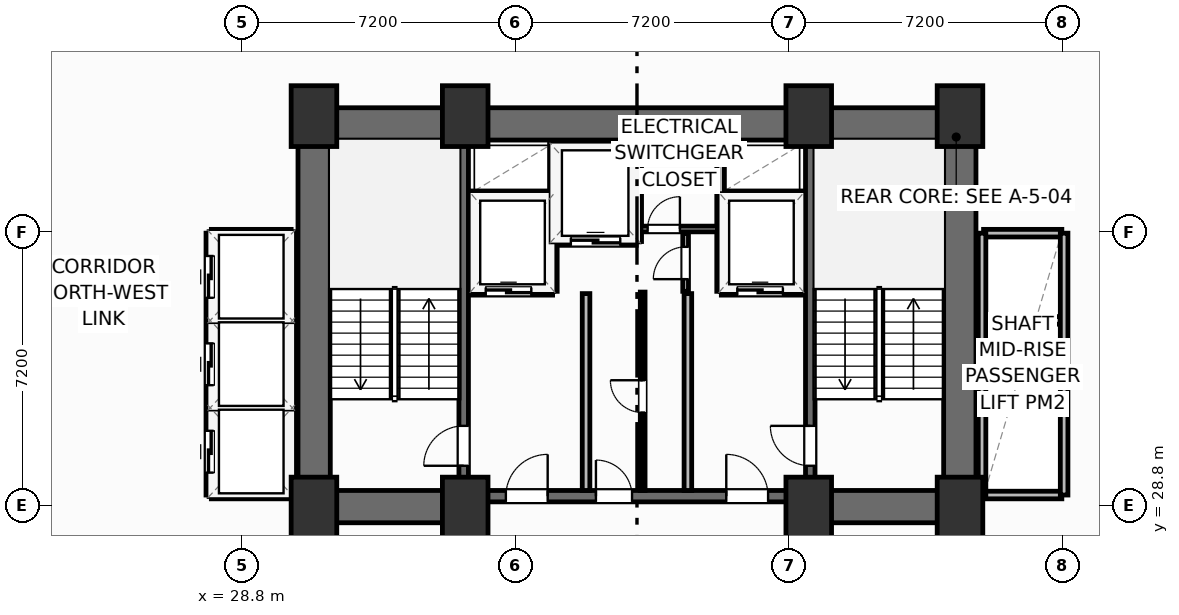
"""IFC4 building model, lengths in metres.
Left out: names, types, materials, properties, quantities, classifications, styles, units other than length and angle.
Written with IfcOpenShell. Run it as: python <this file> out.ifc"""

import sys

from ifc_helpers import new_model, si_unit, direction, frame, frame_2d, origin, origin_2d, place, context, subcontext, project, spatial, rectangle, extrude, element, fill, save


model = new_model("IFC4")
c1 = context("Model", 3, precision=1e-05, world=origin(), true_north=direction((0.0, 1.0)))
c2 = subcontext(c1, "Body", "Model", "MODEL_VIEW")
j1 = project(units=[si_unit("LENGTHUNIT", "METRE"), si_unit("PLANEANGLEUNIT", "RADIAN")], contexts=[c1])
p1 = place(None, origin())
s1 = spatial("IfcSite", under=j1, at=p1, CompositionType="ELEMENT")
p2 = place(p1, origin())
s2 = spatial("IfcBuilding", under=s1, at=p2, CompositionType="ELEMENT")
p3 = place(p2, frame((0.0, 0.0, 67.7)))
s3 = spatial("IfcBuildingStorey", under=s2, at=p3, CompositionType="ELEMENT", Elevation=67.7)
for number, where, z_axis, x_axis in (
    (1, (30.7, 28.75, 0.0), (0.0, 0.0, 1.0), (1.0, 0.0, 0.0)),
    (2, (34.68, 28.75, 0.0), (0.0, 0.0, 1.0), (1.0, 0.0, 0.0)),
    (3, (43.72, 28.75, 0.0), (0.0, 0.0, 1.0), (1.0, 0.0, 0.0)),
    (4, (47.7, 28.75, 0.0), (0.0, 0.0, 1.0), (1.0, 0.0, 0.0)),
    (5, (30.7, 39.05, 0.0), (0.0, 0.0, 1.0), (1.0, 0.0, 0.0)),
    (6, (34.68, 39.05, 0.0), (0.0, 0.0, 1.0), (1.0, 0.0, 0.0)),
    (7, (43.72, 39.05, 0.0), (0.0, 0.0, 1.0), (1.0, 0.0, 0.0)),
    (8, (47.7, 39.05, 0.0), (0.0, 0.0, 1.0), (1.0, 0.0, 0.0)),
):
    element("IfcColumn", number, at=place(p3, frame(where, z_axis=z_axis, x_axis=x_axis)), inside=s3, PredefinedType="COLUMN", context=c2, shape_type="SweptSolid", body=[
        extrude(rectangle(XDim=1.2, YDim=1.6, at=origin_2d()), origin(), (0.0, 0.0, 1.0), 3.7),
    ])
p4 = place(p3, frame((30.28, 38.845, 0.0), z_axis=(0.0, 0.0, 1.0), x_axis=(1.0, 0.0, 0.0)))
e9 = element("IfcWall", 9, at=p4, inside=s3, PredefinedType="SHEAR", context=c2, shape_type="SweptSolid", body=[
    extrude(rectangle(XDim=17.84, YDim=0.85, at=frame_2d((8.92, 0.0))), origin(), (0.0, 0.0, 1.0), 3.38),
])
for number, where, z_axis, x_axis in (
    (10, (30.705, 29.2, 0.0), (0.0, 0.0, 1.0), (0.0, 1.0, 0.0)),
    (11, (47.695, 29.2, 0.0), (0.0, 0.0, 1.0), (0.0, 1.0, 0.0)),
):
    element("IfcWall", number, at=place(p3, frame(where, z_axis=z_axis, x_axis=x_axis)), inside=s3, PredefinedType="SHEAR", context=c2, shape_type="SweptSolid", body=[
        extrude(rectangle(XDim=9.22, YDim=0.85, at=frame_2d((4.61, 0.0))), origin(), (0.0, 0.0, 1.0), 3.38),
    ])
for number, where, z_axis, x_axis in (
    (12, (30.28, 28.775, 0.0), (0.0, 0.0, 1.0), (1.0, 0.0, 0.0)),
    (13, (43.6, 28.775, 0.0), (0.0, 0.0, 1.0), (1.0, 0.0, 0.0)),
):
    element("IfcWall", number, at=place(p3, frame(where, z_axis=z_axis, x_axis=x_axis)), inside=s3, PredefinedType="SHEAR", context=c2, shape_type="SweptSolid", body=[
        extrude(rectangle(XDim=4.52, YDim=0.85, at=frame_2d((2.26, 0.0))), origin(), (0.0, 0.0, 1.0), 3.38),
    ])
p5 = place(p3, frame((34.8, 29.05, 0.0), z_axis=(0.0, 0.0, 1.0), x_axis=(1.0, 0.0, 0.0)))
e14 = element("IfcWall", 14, at=p5, inside=s3, PredefinedType="SHEAR", context=c2, shape_type="SweptSolid", body=[
    extrude(rectangle(XDim=8.8, YDim=0.3, at=frame_2d((4.4, 0.0))), origin(), (0.0, 0.0, 1.0), 3.38),
])
p6 = place(p5, frame((0.95, 0.0, 0.0)))
e15 = element("IfcOpeningElement", 15, at=p6, cuts=e14, PredefinedType="OPENING", context=c2, shape_type="SweptSolid", body=[
    extrude(rectangle(XDim=1.1, YDim=2.15, at=frame_2d((0.55, 1.075))), frame((0.0, 0.16, 0.0), z_axis=(0.0, -1.0, 0.0), x_axis=(1.0, 0.0, 0.0)), (0.0, 0.0, 1.0), 0.32),
])
p7 = place(p5, frame((6.75, 0.0, 0.0)))
e16 = element("IfcOpeningElement", 16, at=p7, cuts=e14, PredefinedType="OPENING", context=c2, shape_type="SweptSolid", body=[
    extrude(rectangle(XDim=1.1, YDim=2.15, at=frame_2d((0.55, 1.075))), frame((0.0, 0.16, 0.0), z_axis=(0.0, -1.0, 0.0), x_axis=(1.0, 0.0, 0.0)), (0.0, 0.0, 1.0), 0.32),
])
p8 = place(p5, frame((3.32, 0.0, 0.0)))
e17 = element("IfcOpeningElement", 17, at=p8, cuts=e14, PredefinedType="OPENING", context=c2, shape_type="SweptSolid", body=[
    extrude(rectangle(XDim=0.95, YDim=2.15, at=frame_2d((0.475, 1.075))), frame((0.0, 0.16, 0.0), z_axis=(0.0, -1.0, 0.0), x_axis=(1.0, 0.0, 0.0)), (0.0, 0.0, 1.0), 0.32),
])
p9 = place(p3, frame((34.64, 29.2, 0.0), z_axis=(0.0, 0.0, 1.0), x_axis=(0.0, 1.0, 0.0)))
e18 = element("IfcWall", 18, at=p9, inside=s3, PredefinedType="SHEAR", context=c2, shape_type="SweptSolid", body=[
    extrude(rectangle(XDim=9.22, YDim=0.25, at=frame_2d((4.61, 0.0))), origin(), (0.0, 0.0, 1.0), 3.38),
])
p10 = place(p9, frame((0.65, 0.0, 0.0)))
e19 = element("IfcOpeningElement", 19, at=p10, cuts=e18, PredefinedType="OPENING", context=c2, shape_type="SweptSolid", body=[
    extrude(rectangle(XDim=1.05, YDim=2.15, at=frame_2d((0.525, 1.075))), frame((0.0, 0.135, 0.0), z_axis=(0.0, -1.0, 0.0), x_axis=(1.0, 0.0, 0.0)), (0.0, 0.0, 1.0), 0.27),
])
p11 = place(p3, frame((43.76, 29.2, 0.0), z_axis=(0.0, 0.0, 1.0), x_axis=(0.0, 1.0, 0.0)))
e20 = element("IfcWall", 20, at=p11, inside=s3, PredefinedType="SHEAR", context=c2, shape_type="SweptSolid", body=[
    extrude(rectangle(XDim=9.22, YDim=0.25, at=frame_2d((4.61, 0.0))), origin(), (0.0, 0.0, 1.0), 3.38),
])
p12 = place(p11, frame((0.65, 0.0, 0.0)))
e21 = element("IfcOpeningElement", 21, at=p12, cuts=e20, PredefinedType="OPENING", context=c2, shape_type="SweptSolid", body=[
    extrude(rectangle(XDim=1.05, YDim=2.15, at=frame_2d((0.525, 1.075))), frame((0.0, 0.135, 0.0), z_axis=(0.0, -1.0, 0.0), x_axis=(1.0, 0.0, 0.0)), (0.0, 0.0, 1.0), 0.27),
])
for number, where, z_axis, x_axis in (
    (22, (37.86, 29.2, 0.0), (0.0, 0.0, 1.0), (0.0, 1.0, 0.0)),
    (23, (40.54, 29.2, 0.0), (0.0, 0.0, 1.0), (0.0, 1.0, 0.0)),
):
    element("IfcWall", number, at=place(p3, frame(where, z_axis=z_axis, x_axis=x_axis)), inside=s3, PredefinedType="PARTITIONING", context=c2, shape_type="SweptSolid", body=[
        extrude(rectangle(XDim=5.18, YDim=0.2, at=frame_2d((2.59, 0.0))), origin(), (0.0, 0.0, 1.0), 3.38),
    ])
p13 = place(p3, frame((34.8, 34.44, 0.0), z_axis=(0.0, 0.0, 1.0), x_axis=(1.0, 0.0, 0.0)))
e24 = element("IfcWall", 24, at=p13, inside=s3, PredefinedType="PARTITIONING", context=c2, shape_type="SweptSolid", body=[
    extrude(rectangle(XDim=2.18, YDim=0.2, at=frame_2d((1.09, 0.0))), origin(), (0.0, 0.0, 1.0), 3.38),
])
p14 = place(p13, frame((0.42, 0.0, 0.0)))
e25 = element("IfcOpeningElement", 25, at=p14, cuts=e24, PredefinedType="OPENING", context=c2, shape_type="SweptSolid", body=[
    extrude(rectangle(XDim=1.2, YDim=2.2, at=frame_2d((0.6, 1.1))), frame((0.0, 0.11, 0.0), z_axis=(0.0, -1.0, 0.0), x_axis=(1.0, 0.0, 0.0)), (0.0, 0.0, 1.0), 0.22),
])
p15 = place(p3, frame((34.8, 36.98, 0.0), z_axis=(0.0, 0.0, 1.0), x_axis=(1.0, 0.0, 0.0)))
e26 = element("IfcWall", 26, at=p15, inside=s3, PredefinedType="PARTITIONING", context=c2, shape_type="SweptSolid", body=[
    extrude(rectangle(XDim=2.18, YDim=0.2, at=frame_2d((1.09, 0.0))), origin(), (0.0, 0.0, 1.0), 3.38),
])
p16 = place(p3, frame((37.0, 34.44, 0.0), z_axis=(0.0, 0.0, 1.0), x_axis=(0.0, 1.0, 0.0)))
e27 = element("IfcWall", 27, at=p16, inside=s3, PredefinedType="PARTITIONING", context=c2, shape_type="SweptSolid", body=[
    extrude(rectangle(XDim=3.9, YDim=0.2, at=frame_2d((1.95, 0.0))), origin(), (0.0, 0.0, 1.0), 3.38),
])
p17 = place(p3, frame((41.42, 34.44, 0.0), z_axis=(0.0, 0.0, 1.0), x_axis=(1.0, 0.0, 0.0)))
e28 = element("IfcWall", 28, at=p17, inside=s3, PredefinedType="PARTITIONING", context=c2, shape_type="SweptSolid", body=[
    extrude(rectangle(XDim=2.18, YDim=0.2, at=frame_2d((1.09, 0.0))), origin(), (0.0, 0.0, 1.0), 3.38),
])
p18 = place(p17, frame((0.42, 0.0, 0.0)))
e29 = element("IfcOpeningElement", 29, at=p18, cuts=e28, PredefinedType="OPENING", context=c2, shape_type="SweptSolid", body=[
    extrude(rectangle(XDim=1.2, YDim=2.2, at=frame_2d((0.6, 1.1))), frame((0.0, 0.11, 0.0), z_axis=(0.0, -1.0, 0.0), x_axis=(1.0, 0.0, 0.0)), (0.0, 0.0, 1.0), 0.22),
])
p19 = place(p3, frame((41.42, 36.98, 0.0), z_axis=(0.0, 0.0, 1.0), x_axis=(1.0, 0.0, 0.0)))
e30 = element("IfcWall", 30, at=p19, inside=s3, PredefinedType="PARTITIONING", context=c2, shape_type="SweptSolid", body=[
    extrude(rectangle(XDim=2.18, YDim=0.2, at=frame_2d((1.09, 0.0))), origin(), (0.0, 0.0, 1.0), 3.38),
])
p20 = place(p3, frame((41.4, 34.44, 0.0), z_axis=(0.0, 0.0, 1.0), x_axis=(0.0, 1.0, 0.0)))
e31 = element("IfcWall", 31, at=p20, inside=s3, PredefinedType="PARTITIONING", context=c2, shape_type="SweptSolid", body=[
    extrude(rectangle(XDim=3.9, YDim=0.2, at=frame_2d((1.95, 0.0))), origin(), (0.0, 0.0, 1.0), 3.38),
])
p21 = place(p3, frame((37.06, 35.75, 0.0), z_axis=(0.0, 0.0, 1.0), x_axis=(1.0, 0.0, 0.0)))
e32 = element("IfcWall", 32, at=p21, inside=s3, PredefinedType="PARTITIONING", context=c2, shape_type="SweptSolid", body=[
    extrude(rectangle(XDim=2.12, YDim=0.2, at=frame_2d((1.06, 0.0))), origin(), (0.0, 0.0, 1.0), 3.38),
])
p22 = place(p21, frame((0.4, 0.0, 0.0)))
e33 = element("IfcOpeningElement", 33, at=p22, cuts=e32, PredefinedType="OPENING", context=c2, shape_type="SweptSolid", body=[
    extrude(rectangle(XDim=1.3, YDim=2.2, at=frame_2d((0.65, 1.1))), frame((0.0, 0.11, 0.0), z_axis=(0.0, -1.0, 0.0), x_axis=(1.0, 0.0, 0.0)), (0.0, 0.0, 1.0), 0.22),
])
p23 = place(p3, frame((39.22, 35.75, 0.0), z_axis=(0.0, 0.0, 1.0), x_axis=(0.0, 1.0, 0.0)))
e34 = element("IfcWall", 34, at=p23, inside=s3, PredefinedType="PARTITIONING", context=c2, shape_type="SweptSolid", body=[
    extrude(rectangle(XDim=2.59, YDim=0.2, at=frame_2d((1.295, 0.0))), origin(), (0.0, 0.0, 1.0), 3.38),
])
p24 = place(p3, frame((39.3, 36.08, 0.0), z_axis=(0.0, 0.0, 1.0), x_axis=(1.0, 0.0, 0.0)))
e35 = element("IfcWall", 35, at=p24, inside=s3, PredefinedType="PARTITIONING", context=c2, shape_type="SweptSolid", body=[
    extrude(rectangle(XDim=2.02, YDim=0.15, at=frame_2d((1.01, 0.0))), origin(), (0.0, 0.0, 1.0), 3.38),
])
p25 = place(p24, frame((0.18, 0.0, 0.0)))
e36 = element("IfcOpeningElement", 36, at=p25, cuts=e35, PredefinedType="OPENING", context=c2, shape_type="SweptSolid", body=[
    extrude(rectangle(XDim=0.85, YDim=2.05, at=frame_2d((0.425, 1.025))), frame((0.0, 0.085, 0.0), z_axis=(0.0, -1.0, 0.0), x_axis=(1.0, 0.0, 0.0)), (0.0, 0.0, 1.0), 0.17),
])
p26 = place(p3, frame((40.48, 34.44, 0.0), z_axis=(0.0, 0.0, 1.0), x_axis=(0.0, 1.0, 0.0)))
e37 = element("IfcWall", 37, at=p26, inside=s3, PredefinedType="PARTITIONING", context=c2, shape_type="SweptSolid", body=[
    extrude(rectangle(XDim=1.52, YDim=0.15, at=frame_2d((0.76, 0.0))), origin(), (0.0, 0.0, 1.0), 3.38),
])
p27 = place(p26, frame((0.32, 0.0, 0.0)))
e38 = element("IfcOpeningElement", 38, at=p27, cuts=e37, PredefinedType="OPENING", context=c2, shape_type="SweptSolid", body=[
    extrude(rectangle(XDim=0.85, YDim=2.05, at=frame_2d((0.425, 1.025))), frame((0.0, 0.085, 0.0), z_axis=(0.0, -1.0, 0.0), x_axis=(1.0, 0.0, 0.0)), (0.0, 0.0, 1.0), 0.17),
])
p28 = place(p3, frame((39.35, 29.2, 0.0), z_axis=(0.0, 0.0, 1.0), x_axis=(0.0, 1.0, 0.0)))
e39 = element("IfcWall", 39, at=p28, inside=s3, PredefinedType="PARTITIONING", context=c2, shape_type="SweptSolid", body=[
    extrude(rectangle(XDim=5.22, YDim=0.125, at=frame_2d((2.61, 0.0))), origin(), (0.0, 0.0, 1.0), 3.38),
])
p29 = place(p28, frame((2.05, 0.0, 0.0)))
e40 = element("IfcOpeningElement", 40, at=p29, cuts=e39, PredefinedType="OPENING", context=c2, shape_type="SweptSolid", body=[
    extrude(rectangle(XDim=0.85, YDim=2.05, at=frame_2d((0.425, 1.025))), frame((0.0, 0.073, 0.0), z_axis=(0.0, -1.0, 0.0), x_axis=(1.0, 0.0, 0.0)), (0.0, 0.0, 1.0), 0.145),
])
for number, where, z_axis, x_axis in (
    (41, (28.02, 31.375, 0.0), (0.0, 0.0, 1.0), (1.0, 0.0, 0.0)),
    (42, (28.02, 33.675, 0.0), (0.0, 0.0, 1.0), (1.0, 0.0, 0.0)),
):
    element("IfcWall", number, at=place(p3, frame(where, z_axis=z_axis, x_axis=x_axis)), inside=s3, PredefinedType="PARTITIONING", context=c2, shape_type="SweptSolid", body=[
        extrude(rectangle(XDim=2.06, YDim=0.2, at=frame_2d((1.03, 0.0))), origin(), (0.0, 0.0, 1.0), 3.38),
    ])
for number, where, z_axis, x_axis in (
    (43, (28.0, 29.08, 0.0), (0.0, 0.0, 1.0), (1.0, 0.0, 0.0)),
    (44, (28.0, 35.97, 0.0), (0.0, 0.0, 1.0), (1.0, 0.0, 0.0)),
):
    element("IfcWall", number, at=place(p3, frame(where, z_axis=z_axis, x_axis=x_axis)), inside=s3, PredefinedType="PARTITIONING", context=c2, shape_type="SweptSolid", body=[
        extrude(rectangle(XDim=2.1, YDim=0.2, at=frame_2d((1.05, 0.0))), origin(), (0.0, 0.0, 1.0), 3.38),
    ])
p30 = place(p3, frame((30.12, 29.08, 0.0), z_axis=(0.0, 0.0, 1.0), x_axis=(0.0, 1.0, 0.0)))
e45 = element("IfcWall", 45, at=p30, inside=s3, PredefinedType="PARTITIONING", context=c2, shape_type="SweptSolid", body=[
    extrude(rectangle(XDim=6.89, YDim=0.2, at=frame_2d((3.445, 0.0))), origin(), (0.0, 0.0, 1.0), 3.38),
])
p31 = place(p3, frame((27.96, 29.08, 0.0), z_axis=(0.0, 0.0, 1.0), x_axis=(0.0, 1.0, 0.0)))
e46 = element("IfcWall", 46, at=p31, inside=s3, PredefinedType="PARTITIONING", context=c2, shape_type="SweptSolid", body=[
    extrude(rectangle(XDim=6.89, YDim=0.2, at=frame_2d((3.445, 0.0))), origin(), (0.0, 0.0, 1.0), 3.38),
])
p32 = place(p31, frame((0.59, 0.0, 0.0)))
e47 = element("IfcOpeningElement", 47, at=p32, cuts=e46, PredefinedType="OPENING", context=c2, shape_type="SweptSolid", body=[
    extrude(rectangle(XDim=1.1, YDim=2.15, at=frame_2d((0.55, 1.075))), frame((0.0, 0.11, 0.0), z_axis=(0.0, -1.0, 0.0), x_axis=(1.0, 0.0, 0.0)), (0.0, 0.0, 1.0), 0.22),
])
p33 = place(p31, frame((2.89, 0.0, 0.0)))
e48 = element("IfcOpeningElement", 48, at=p33, cuts=e46, PredefinedType="OPENING", context=c2, shape_type="SweptSolid", body=[
    extrude(rectangle(XDim=1.1, YDim=2.15, at=frame_2d((0.55, 1.075))), frame((0.0, 0.11, 0.0), z_axis=(0.0, -1.0, 0.0), x_axis=(1.0, 0.0, 0.0)), (0.0, 0.0, 1.0), 0.22),
])
p34 = place(p31, frame((5.19, 0.0, 0.0)))
e49 = element("IfcOpeningElement", 49, at=p34, cuts=e46, PredefinedType="OPENING", context=c2, shape_type="SweptSolid", body=[
    extrude(rectangle(XDim=1.1, YDim=2.15, at=frame_2d((0.55, 1.075))), frame((0.0, 0.11, 0.0), z_axis=(0.0, -1.0, 0.0), x_axis=(1.0, 0.0, 0.0)), (0.0, 0.0, 1.0), 0.22),
])
for number, where, z_axis, x_axis in (
    (50, (48.32, 31.375, 0.0), (0.0, 0.0, 1.0), (1.0, 0.0, 0.0)),
    (51, (48.32, 33.675, 0.0), (0.0, 0.0, 1.0), (1.0, 0.0, 0.0)),
):
    element("IfcWall", number, at=place(p3, frame(where, z_axis=z_axis, x_axis=x_axis)), inside=s3, PredefinedType="PARTITIONING", context=c2, shape_type="SweptSolid", body=[
        extrude(rectangle(XDim=2.06, YDim=0.2, at=frame_2d((1.03, 0.0))), origin(), (0.0, 0.0, 1.0), 3.38),
    ])
p35 = place(p3, frame((48.32, 29.08, 0.0), z_axis=(0.0, 0.0, 1.0), x_axis=(1.0, 0.0, 0.0)))
e52 = element("IfcWall", 52, at=p35, inside=s3, PredefinedType="PARTITIONING", context=c2, shape_type="SweptSolid", body=[
    extrude(rectangle(XDim=2.06, YDim=0.2, at=frame_2d((1.03, 0.0))), origin(), (0.0, 0.0, 1.0), 2.592),
])
p36 = place(p3, frame((48.32, 35.97, 0.0), z_axis=(0.0, 0.0, 1.0), x_axis=(1.0, 0.0, 0.0)))
e53 = element("IfcWall", 53, at=p36, inside=s3, PredefinedType="PARTITIONING", context=c2, shape_type="SweptSolid", body=[
    extrude(rectangle(XDim=2.06, YDim=0.2, at=frame_2d((1.03, 0.0))), origin(), (0.0, 0.0, 1.0), 3.38),
])
for number, where, z_axis, x_axis in (
    (54, (48.28, 29.08, 0.0), (0.0, 0.0, 1.0), (0.0, 1.0, 0.0)),
    (55, (50.44, 29.08, 0.0), (0.0, 0.0, 1.0), (0.0, 1.0, 0.0)),
):
    element("IfcWall", number, at=place(p3, frame(where, z_axis=z_axis, x_axis=x_axis)), inside=s3, PredefinedType="PARTITIONING", context=c2, shape_type="SweptSolid", body=[
        extrude(rectangle(XDim=6.89, YDim=0.2, at=frame_2d((3.445, 0.0))), origin(), (0.0, 0.0, 1.0), 3.38),
    ])
p37 = place(p10, origin())
e56 = element("IfcDoor", 56, at=p37, inside=s3, OperationType="SINGLE_SWING_LEFT", PredefinedType="DOOR", context=c2, shape_type="SweptSolid", body=[
    extrude(rectangle(XDim=1.05, YDim=2.15, at=frame_2d((0.525, 1.075))), frame((0.0, 0.025, 0.0), z_axis=(0.0, -1.0, 0.0), x_axis=(1.0, 0.0, 0.0)), (0.0, 0.0, 1.0), 0.05),
])
fill(e19, e56)
p38 = place(p12, origin())
e57 = element("IfcDoor", 57, at=p38, inside=s3, OperationType="SINGLE_SWING_RIGHT", PredefinedType="DOOR", context=c2, shape_type="SweptSolid", body=[
    extrude(rectangle(XDim=1.05, YDim=2.15, at=frame_2d((0.525, 1.075))), frame((0.0, 0.025, 0.0), z_axis=(0.0, -1.0, 0.0), x_axis=(1.0, 0.0, 0.0)), (0.0, 0.0, 1.0), 0.05),
])
fill(e21, e57)
p39 = place(p6, origin())
e58 = element("IfcDoor", 58, at=p39, inside=s3, OperationType="SINGLE_SWING_RIGHT", PredefinedType="DOOR", context=c2, shape_type="SweptSolid", body=[
    extrude(rectangle(XDim=1.1, YDim=2.15, at=frame_2d((0.55, 1.075))), frame((0.0, 0.025, 0.0), z_axis=(0.0, -1.0, 0.0), x_axis=(1.0, 0.0, 0.0)), (0.0, 0.0, 1.0), 0.05),
])
fill(e15, e58)
p40 = place(p7, origin())
e59 = element("IfcDoor", 59, at=p40, inside=s3, OperationType="SINGLE_SWING_LEFT", PredefinedType="DOOR", context=c2, shape_type="SweptSolid", body=[
    extrude(rectangle(XDim=1.1, YDim=2.15, at=frame_2d((0.55, 1.075))), frame((0.0, 0.025, 0.0), z_axis=(0.0, -1.0, 0.0), x_axis=(1.0, 0.0, 0.0)), (0.0, 0.0, 1.0), 0.05),
])
fill(e16, e59)
p41 = place(p14, origin())
e60 = element("IfcDoor", 60, at=p41, inside=s3, OperationType="SLIDING_TO_LEFT", PredefinedType="DOOR", context=c2, shape_type="SweptSolid", body=[
    extrude(rectangle(XDim=1.2, YDim=2.2, at=frame_2d((0.6, 1.1))), frame((0.0, 0.025, 0.0), z_axis=(0.0, -1.0, 0.0), x_axis=(1.0, 0.0, 0.0)), (0.0, 0.0, 1.0), 0.05),
])
fill(e25, e60)
p42 = place(p18, origin())
e61 = element("IfcDoor", 61, at=p42, inside=s3, OperationType="SLIDING_TO_LEFT", PredefinedType="DOOR", context=c2, shape_type="SweptSolid", body=[
    extrude(rectangle(XDim=1.2, YDim=2.2, at=frame_2d((0.6, 1.1))), frame((0.0, 0.025, 0.0), z_axis=(0.0, -1.0, 0.0), x_axis=(1.0, 0.0, 0.0)), (0.0, 0.0, 1.0), 0.05),
])
fill(e29, e61)
p43 = place(p22, origin())
e62 = element("IfcDoor", 62, at=p43, inside=s3, OperationType="SLIDING_TO_LEFT", PredefinedType="DOOR", context=c2, shape_type="SweptSolid", body=[
    extrude(rectangle(XDim=1.3, YDim=2.2, at=frame_2d((0.65, 1.1))), frame((0.0, 0.025, 0.0), z_axis=(0.0, -1.0, 0.0), x_axis=(1.0, 0.0, 0.0)), (0.0, 0.0, 1.0), 0.05),
])
fill(e33, e62)
p44 = place(p25, origin())
e63 = element("IfcDoor", 63, at=p44, inside=s3, OperationType="SINGLE_SWING_RIGHT", PredefinedType="DOOR", context=c2, shape_type="SweptSolid", body=[
    extrude(rectangle(XDim=0.85, YDim=2.05, at=frame_2d((0.425, 1.025))), frame((0.0, 0.025, 0.0), z_axis=(0.0, -1.0, 0.0), x_axis=(1.0, 0.0, 0.0)), (0.0, 0.0, 1.0), 0.05),
])
fill(e36, e63)
p45 = place(p27, origin())
e64 = element("IfcDoor", 64, at=p45, inside=s3, OperationType="SINGLE_SWING_LEFT", PredefinedType="DOOR", context=c2, shape_type="SweptSolid", body=[
    extrude(rectangle(XDim=0.85, YDim=2.05, at=frame_2d((0.425, 1.025))), frame((0.0, 0.025, 0.0), z_axis=(0.0, -1.0, 0.0), x_axis=(1.0, 0.0, 0.0)), (0.0, 0.0, 1.0), 0.05),
])
fill(e38, e64)
p46 = place(p29, origin())
e65 = element("IfcDoor", 65, at=p46, inside=s3, OperationType="SINGLE_SWING_RIGHT", PredefinedType="DOOR", context=c2, shape_type="SweptSolid", body=[
    extrude(rectangle(XDim=0.85, YDim=2.05, at=frame_2d((0.425, 1.025))), frame((0.0, 0.025, 0.0), z_axis=(0.0, -1.0, 0.0), x_axis=(1.0, 0.0, 0.0)), (0.0, 0.0, 1.0), 0.05),
])
fill(e40, e65)
p47 = place(p8, origin())
e66 = element("IfcDoor", 66, at=p47, inside=s3, OperationType="SINGLE_SWING_LEFT", PredefinedType="DOOR", context=c2, shape_type="SweptSolid", body=[
    extrude(rectangle(XDim=0.95, YDim=2.15, at=frame_2d((0.475, 1.075))), frame((0.0, 0.025, 0.0), z_axis=(0.0, -1.0, 0.0), x_axis=(1.0, 0.0, 0.0)), (0.0, 0.0, 1.0), 0.05),
])
fill(e17, e66)
p48 = place(p32, origin())
e67 = element("IfcDoor", 67, at=p48, inside=s3, OperationType="SLIDING_TO_LEFT", PredefinedType="DOOR", context=c2, shape_type="SweptSolid", body=[
    extrude(rectangle(XDim=1.1, YDim=2.15, at=frame_2d((0.55, 1.075))), frame((0.0, 0.025, 0.0), z_axis=(0.0, -1.0, 0.0), x_axis=(1.0, 0.0, 0.0)), (0.0, 0.0, 1.0), 0.05),
])
fill(e47, e67)
p49 = place(p33, origin())
e68 = element("IfcDoor", 68, at=p49, inside=s3, OperationType="SLIDING_TO_LEFT", PredefinedType="DOOR", context=c2, shape_type="SweptSolid", body=[
    extrude(rectangle(XDim=1.1, YDim=2.15, at=frame_2d((0.55, 1.075))), frame((0.0, 0.025, 0.0), z_axis=(0.0, -1.0, 0.0), x_axis=(1.0, 0.0, 0.0)), (0.0, 0.0, 1.0), 0.05),
])
fill(e48, e68)
p50 = place(p34, origin())
e69 = element("IfcDoor", 69, at=p50, inside=s3, OperationType="SLIDING_TO_LEFT", PredefinedType="DOOR", context=c2, shape_type="SweptSolid", body=[
    extrude(rectangle(XDim=1.1, YDim=2.15, at=frame_2d((0.55, 1.075))), frame((0.0, 0.025, 0.0), z_axis=(0.0, -1.0, 0.0), x_axis=(1.0, 0.0, 0.0)), (0.0, 0.0, 1.0), 0.05),
])
fill(e49, e69)
save(model, sys.argv[1])
